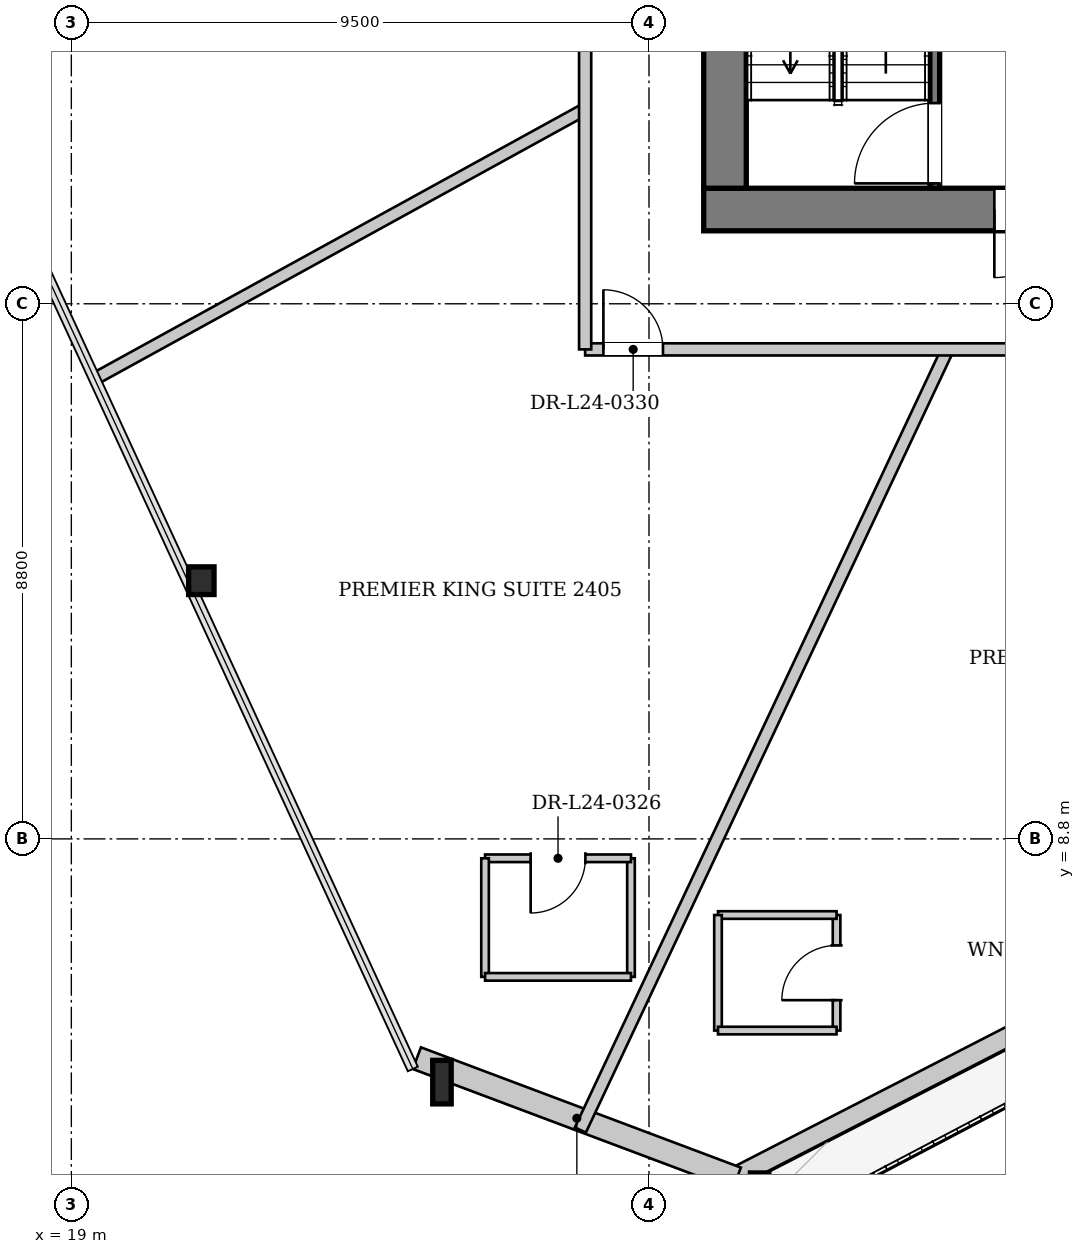
"""IFC4 building model, lengths in metres.
Left out: names, types, materials, properties, quantities, classifications, styles, units other than length and angle.
Written with IfcOpenShell. Run it as: python <this file> out.ifc"""

import sys

from ifc_helpers import new_model, si_unit, direction, frame, frame_2d, origin, origin_2d, place, context, subcontext, project, spatial, rectangle, i_section, extrude, source, transform, mapped, element, fill, save


model = new_model("IFC4")
c1 = context("Model", 3, precision=1e-05, world=origin(), true_north=direction((0.0, 1.0)))
c2 = subcontext(c1, "Body", "Model", "MODEL_VIEW")
j1 = project(units=[si_unit("LENGTHUNIT", "METRE"), si_unit("PLANEANGLEUNIT", "RADIAN")], contexts=[c1])
p1 = place(None, origin())
s1 = spatial("IfcSite", under=j1, at=p1, CompositionType="ELEMENT")
p2 = place(p1, origin())
s2 = spatial("IfcBuilding", under=s1, at=p2, CompositionType="ELEMENT")
p3 = place(p2, frame((0.0, 0.0, 95.05)))
s3 = spatial("IfcBuildingStorey", under=s2, at=p3, CompositionType="ELEMENT", Elevation=95.05)
m1 = source(origin(), c2, "Body", "SweptSolid", [
    extrude(i_section(OverallWidth=0.418, OverallDepth=0.455, WebThickness=0.038, FlangeThickness=0.059, at=origin_2d()), origin(), (0.0, 0.0, 1.0), 3.509),
])
p4 = place(p3, frame((20.779, 13.337, 0.0), z_axis=(0.204689999559, -0.165936658378, 0.964659022394), x_axis=(0.629737371555, 0.776808111998, 0.0)))
e1 = element("IfcColumn", 1, at=p4, inside=s3, PredefinedType="COLUMN", context=c2, shape_type="MappedRepresentation", body=[
    mapped(m1, transform((0.0, 0.0, 0.0), x_axis=(1.0, 0.0, 0.0), y_axis=(0.0, 1.0, 0.0), z_axis=(0.0, 0.0, 1.0), scale=1.0)),
])
m2 = source(origin(), c2, "Body", "SweptSolid", [
    extrude(i_section(OverallWidth=0.304, OverallDepth=0.716, WebThickness=0.021, FlangeThickness=0.04, at=origin_2d()), origin(), (0.0, 0.0, 1.0), 3.544),
])
p5 = place(p3, frame((24.616, 5.016, 0.0), z_axis=(0.270218966562, -0.122056591575, 0.955030836446), x_axis=(0.411648964628, 0.911342487718, 0.0)))
e2 = element("IfcColumn", 2, at=p5, inside=s3, PredefinedType="COLUMN", context=c2, shape_type="MappedRepresentation", body=[
    mapped(m2, transform((0.0, 0.0, 0.0), x_axis=(1.0, 0.0, 0.0), y_axis=(0.0, 1.0, 0.0), z_axis=(0.0, 0.0, 1.0), scale=1.0)),
])
p6 = place(p3, frame((51.286, 14.217, 0.0), z_axis=(0.0, 0.0, 1.0), x_axis=(-0.889491175816, -0.456952347785, 0.0)))
e3 = element("IfcWall", 3, at=p6, inside=s3, PredefinedType="SOLIDWALL", context=c2, shape_type="SweptSolid", body=[
    extrude(rectangle(XDim=24.151, YDim=0.32, at=frame_2d((12.075, 0.0))), origin(), (0.0, 0.0, 1.0), 2.692),
])
p7 = place(p6, frame((7.178, 0.0, 0.0)))
e4 = element("IfcOpeningElement", 4, at=p7, cuts=e3, PredefinedType="OPENING", context=c2, shape_type="SweptSolid", body=[
    extrude(rectangle(XDim=1.1, YDim=2.3, at=frame_2d((0.55, 1.15))), frame((0.0, 0.17, 0.0), z_axis=(0.0, -1.0, 0.0), x_axis=(1.0, 0.0, 0.0)), (0.0, 0.0, 1.0), 0.34),
])
p8 = place(p6, frame((16.971, 0.0, 0.372)))
e5 = element("IfcOpeningElement", 5, at=p8, cuts=e3, PredefinedType="OPENING", context=c2, shape_type="SweptSolid", body=[
    extrude(rectangle(XDim=1.8, YDim=2.2, at=frame_2d((0.9, 1.1))), frame((0.0, 0.17, 0.0), z_axis=(0.0, -1.0, 0.0), x_axis=(1.0, 0.0, 0.0)), (0.0, 0.0, 1.0), 0.34),
])
p9 = place(p3, frame((29.944, 3.217, 0.0), z_axis=(0.0, 0.0, 1.0), x_axis=(-0.936080825312, 0.351785003211, 0.0)))
e6 = element("IfcWall", 6, at=p9, inside=s3, PredefinedType="SOLIDWALL", context=c2, shape_type="SweptSolid", body=[
    extrude(rectangle(XDim=5.621, YDim=0.38, at=frame_2d((2.811, 0.0))), origin(), (0.0, 0.0, 1.0), 2.692),
])
p10 = place(p3, frame((46.6, 19.15, 0.0), z_axis=(0.0, 0.0, 1.0), x_axis=(-1.0, 0.0, 0.0)))
e7 = element("IfcWall", 7, at=p10, inside=s3, PredefinedType="SHEAR", context=c2, shape_type="SweptSolid", body=[
    extrude(rectangle(XDim=17.2, YDim=0.7, at=frame_2d((8.6, 0.0))), origin(), (0.0, 0.0, 1.0), 3.3),
])
p11 = place(p10, frame((4.8, 0.0, 0.0)))
e8 = element("IfcOpeningElement", 8, at=p11, cuts=e7, PredefinedType="OPENING", context=c2, shape_type="SweptSolid", body=[
    extrude(rectangle(XDim=1.12, YDim=2.25, at=frame_2d((0.56, 1.125))), frame((0.0, 0.36, 0.0), z_axis=(0.0, -1.0, 0.0), x_axis=(1.0, 0.0, 0.0)), (0.0, 0.0, 1.0), 0.72),
])
p12 = place(p10, frame((11.3, 0.0, 0.0)))
e9 = element("IfcOpeningElement", 9, at=p12, cuts=e7, PredefinedType="OPENING", context=c2, shape_type="SweptSolid", body=[
    extrude(rectangle(XDim=1.12, YDim=2.25, at=frame_2d((0.56, 1.125))), frame((0.0, 0.36, 0.0), z_axis=(0.0, -1.0, 0.0), x_axis=(1.0, 0.0, 0.0)), (0.0, 0.0, 1.0), 0.72),
])
p13 = place(p3, frame((29.75, 19.5, 0.0), z_axis=(0.0, 0.0, 1.0), x_axis=(0.0, 1.0, 0.0)))
e10 = element("IfcWall", 10, at=p13, inside=s3, PredefinedType="SHEAR", context=c2, shape_type="SweptSolid", body=[
    extrude(rectangle(XDim=14.2, YDim=0.7, at=frame_2d((7.1, 0.0))), origin(), (0.0, 0.0, 1.0), 3.3),
])
p14 = place(p13, frame((7.42, 0.0, 0.0)))
e11 = element("IfcOpeningElement", 11, at=p14, cuts=e10, PredefinedType="OPENING", context=c2, shape_type="SweptSolid", body=[
    extrude(rectangle(XDim=1.6, YDim=2.2, at=frame_2d((0.8, 1.1))), frame((0.0, 0.36, 0.0), z_axis=(0.0, -1.0, 0.0), x_axis=(1.0, 0.0, 0.0)), (0.0, 0.0, 1.0), 0.72),
])
p15 = place(p3, frame((33.2, 19.5, 0.0), z_axis=(0.0, 0.0, 1.0), x_axis=(0.0, 1.0, 0.0)))
e12 = element("IfcWall", 12, at=p15, inside=s3, PredefinedType="PARTITIONING", context=c2, shape_type="SweptSolid", body=[
    extrude(rectangle(XDim=7.46, YDim=0.16, at=frame_2d((3.73, 0.0))), origin(), (0.0, 0.0, 1.0), 3.3),
])
p16 = place(p15, frame((0.08, 0.0, 0.0)))
e13 = element("IfcOpeningElement", 13, at=p16, cuts=e12, PredefinedType="OPENING", context=c2, shape_type="SweptSolid", body=[
    extrude(rectangle(XDim=1.32, YDim=2.2, at=frame_2d((0.66, 1.1))), frame((0.0, 0.09, 0.0), z_axis=(0.0, -1.0, 0.0), x_axis=(1.0, 0.0, 0.0)), (0.0, 0.0, 1.0), 0.18),
])
p17 = place(p3, frame((27.45, 20.8, 0.0), z_axis=(0.0, 0.0, 1.0), x_axis=(-0.876309701185, -0.481748178625, 0.0)))
e14 = element("IfcWall", 14, at=p17, inside=s3, PredefinedType="PARTITIONING", context=c2, shape_type="SweptSolid", body=[
    extrude(rectangle(XDim=9.176, YDim=0.2, at=frame_2d((4.588, 0.0))), origin(), (0.0, 0.0, 1.0), 3.3),
])
p18 = place(p3, frame((33.412, 16.85, 0.0), z_axis=(0.0, 0.0, 1.0), x_axis=(-0.425776318431, -0.904828451511, 0.0)))
e15 = element("IfcWall", 15, at=p18, inside=s3, PredefinedType="PARTITIONING", context=c2, shape_type="SweptSolid", body=[
    extrude(rectangle(XDim=14.188, YDim=0.2, at=frame_2d((7.094, 0.0))), origin(), (0.0, 0.0, 1.0), 3.3),
])
p19 = place(p3, frame((28.204, 6.531, 0.0), z_axis=(0.0, 0.0, 1.0), x_axis=(0.0, 1.0, 0.0)))
e16 = element("IfcWall", 16, at=p19, inside=s3, PredefinedType="PARTITIONING", context=c2, shape_type="SweptSolid", body=[
    extrude(rectangle(XDim=1.95, YDim=0.125, at=frame_2d((0.975, 0.0))), origin(), (0.0, 0.0, 1.0), 3.3),
])
p20 = place(p3, frame((28.204, 8.481, 0.0), z_axis=(0.0, 0.0, 1.0), x_axis=(-1.0, 0.0, 0.0)))
e17 = element("IfcWall", 17, at=p20, inside=s3, PredefinedType="PARTITIONING", context=c2, shape_type="SweptSolid", body=[
    extrude(rectangle(XDim=2.4, YDim=0.125, at=frame_2d((1.2, 0.0))), origin(), (0.0, 0.0, 1.0), 3.3),
])
p21 = place(p20, frame((0.75, 0.0, 0.0)))
e18 = element("IfcOpeningElement", 18, at=p21, cuts=e17, PredefinedType="OPENING", context=c2, shape_type="SweptSolid", body=[
    extrude(rectangle(XDim=0.9, YDim=2.1, at=frame_2d((0.45, 1.05))), frame((0.0, 0.073, 0.0), z_axis=(0.0, -1.0, 0.0), x_axis=(1.0, 0.0, 0.0)), (0.0, 0.0, 1.0), 0.145),
])
p22 = place(p3, frame((25.804, 8.481, 0.0), z_axis=(0.0, 0.0, 1.0), x_axis=(0.0, -1.0, 0.0)))
e19 = element("IfcWall", 19, at=p22, inside=s3, PredefinedType="PARTITIONING", context=c2, shape_type="SweptSolid", body=[
    extrude(rectangle(XDim=1.95, YDim=0.125, at=frame_2d((0.975, 0.0))), origin(), (0.0, 0.0, 1.0), 3.3),
])
p23 = place(p3, frame((25.804, 6.531, 0.0), z_axis=(0.0, 0.0, 1.0), x_axis=(1.0, 0.0, 0.0)))
e20 = element("IfcWall", 20, at=p23, inside=s3, PredefinedType="PARTITIONING", context=c2, shape_type="SweptSolid", body=[
    extrude(rectangle(XDim=2.4, YDim=0.125, at=frame_2d((1.2, 0.0))), origin(), (0.0, 0.0, 1.0), 3.3),
])
p24 = place(p3, frame((31.585, 5.648, 0.0), z_axis=(0.0, 0.0, 1.0), x_axis=(0.0, 1.0, 0.0)))
e21 = element("IfcWall", 21, at=p24, inside=s3, PredefinedType="PARTITIONING", context=c2, shape_type="SweptSolid", body=[
    extrude(rectangle(XDim=1.9, YDim=0.125, at=frame_2d((0.95, 0.0))), origin(), (0.0, 0.0, 1.0), 2.795),
])
p25 = place(p24, frame((0.5, 0.0, 0.0)))
e22 = element("IfcOpeningElement", 22, at=p25, cuts=e21, PredefinedType="OPENING", context=c2, shape_type="SweptSolid", body=[
    extrude(rectangle(XDim=0.9, YDim=2.1, at=frame_2d((0.45, 1.05))), frame((0.0, 0.073, 0.0), z_axis=(0.0, -1.0, 0.0), x_axis=(1.0, 0.0, 0.0)), (0.0, 0.0, 1.0), 0.145),
])
p26 = place(p3, frame((31.585, 7.548, 0.0), z_axis=(0.0, 0.0, 1.0), x_axis=(-1.0, 0.0, 0.0)))
e23 = element("IfcWall", 23, at=p26, inside=s3, PredefinedType="PARTITIONING", context=c2, shape_type="SweptSolid", body=[
    extrude(rectangle(XDim=1.95, YDim=0.125, at=frame_2d((0.975, 0.0))), origin(), (0.0, 0.0, 1.0), 3.3),
])
p27 = place(p3, frame((29.635, 7.548, 0.0), z_axis=(0.0, 0.0, 1.0), x_axis=(0.0, -1.0, 0.0)))
e24 = element("IfcWall", 24, at=p27, inside=s3, PredefinedType="PARTITIONING", context=c2, shape_type="SweptSolid", body=[
    extrude(rectangle(XDim=1.9, YDim=0.125, at=frame_2d((0.95, 0.0))), origin(), (0.0, 0.0, 1.0), 3.3),
])
p28 = place(p3, frame((29.635, 5.648, 0.0), z_axis=(0.0, 0.0, 1.0), x_axis=(1.0, 0.0, 0.0)))
e25 = element("IfcWall", 25, at=p28, inside=s3, PredefinedType="PARTITIONING", context=c2, shape_type="SweptSolid", body=[
    extrude(rectangle(XDim=1.95, YDim=0.125, at=frame_2d((0.975, 0.0))), origin(), (0.0, 0.0, 1.0), 3.3),
])
p29 = place(p3, frame((27.45, 16.85, 0.0), z_axis=(0.0, 0.0, 1.0), x_axis=(1.0, 0.0, 0.0)))
e26 = element("IfcWall", 26, at=p29, inside=s3, PredefinedType="PARTITIONING", context=c2, shape_type="SweptSolid", body=[
    extrude(rectangle(XDim=21.1, YDim=0.2, at=frame_2d((10.55, 0.0))), origin(), (0.0, 0.0, 1.0), 3.3),
])
p30 = place(p29, frame((0.3, 0.0, 0.0)))
e27 = element("IfcOpeningElement", 27, at=p30, cuts=e26, PredefinedType="OPENING", context=c2, shape_type="SweptSolid", body=[
    extrude(rectangle(XDim=0.98, YDim=2.15, at=frame_2d((0.49, 1.075))), frame((0.0, 0.11, 0.0), z_axis=(0.0, -1.0, 0.0), x_axis=(1.0, 0.0, 0.0)), (0.0, 0.0, 1.0), 0.22),
])
p31 = place(p29, frame((8.16, 0.0, 0.0)))
e28 = element("IfcOpeningElement", 28, at=p31, cuts=e26, PredefinedType="OPENING", context=c2, shape_type="SweptSolid", body=[
    extrude(rectangle(XDim=0.98, YDim=2.15, at=frame_2d((0.49, 1.075))), frame((0.0, 0.11, 0.0), z_axis=(0.0, -1.0, 0.0), x_axis=(1.0, 0.0, 0.0)), (0.0, 0.0, 1.0), 0.22),
])
p32 = place(p29, frame((18.286, 0.0, 0.0)))
e29 = element("IfcOpeningElement", 29, at=p32, cuts=e26, PredefinedType="OPENING", context=c2, shape_type="SweptSolid", body=[
    extrude(rectangle(XDim=0.98, YDim=2.15, at=frame_2d((0.49, 1.075))), frame((0.0, 0.11, 0.0), z_axis=(0.0, -1.0, 0.0), x_axis=(1.0, 0.0, 0.0)), (0.0, 0.0, 1.0), 0.22),
])
p33 = place(p3, frame((27.45, 16.85, 0.0), z_axis=(0.0, 0.0, 1.0), x_axis=(0.0, 1.0, 0.0)))
e30 = element("IfcWall", 30, at=p33, inside=s3, PredefinedType="PARTITIONING", context=c2, shape_type="SweptSolid", body=[
    extrude(rectangle(XDim=19.5, YDim=0.2, at=frame_2d((9.75, 0.0))), origin(), (0.0, 0.0, 1.0), 3.3),
])
p34 = place(p33, frame((15.435, 0.0, 0.0)))
e31 = element("IfcOpeningElement", 31, at=p34, cuts=e30, PredefinedType="OPENING", context=c2, shape_type="SweptSolid", body=[
    extrude(rectangle(XDim=0.98, YDim=2.15, at=frame_2d((0.49, 1.075))), frame((0.0, 0.11, 0.0), z_axis=(0.0, -1.0, 0.0), x_axis=(1.0, 0.0, 0.0)), (0.0, 0.0, 1.0), 0.22),
])
p35 = place(p33, frame((6.365, 0.0, 0.0)))
e32 = element("IfcOpeningElement", 32, at=p35, cuts=e30, PredefinedType="OPENING", context=c2, shape_type="SweptSolid", body=[
    extrude(rectangle(XDim=0.98, YDim=2.15, at=frame_2d((0.49, 1.075))), frame((0.0, 0.11, 0.0), z_axis=(0.0, -1.0, 0.0), x_axis=(1.0, 0.0, 0.0)), (0.0, 0.0, 1.0), 0.22),
])
m3 = source(origin(), c2, "Body", "SweptSolid", [
    extrude(rectangle(XDim=1.12, YDim=2.25, at=frame_2d((0.56, 1.125))), frame((0.0, 0.025, 0.0), z_axis=(0.0, -1.0, 0.0), x_axis=(1.0, 0.0, 0.0)), (0.0, 0.0, 1.0), 0.05),
])
p36 = place(p12, origin())
e33 = element("IfcDoor", 33, at=p36, inside=s3, OperationType="SINGLE_SWING_RIGHT", PredefinedType="DOOR", context=c2, shape_type="MappedRepresentation", body=[
    mapped(m3, transform((0.0, 0.0, 0.0), x_axis=(1.0, 0.0, 0.0), y_axis=(0.0, 1.0, 0.0), z_axis=(0.0, 0.0, 1.0), scale=1.0)),
])
fill(e9, e33)
m4 = source(origin(), c2, "Body", "SweptSolid", [
    extrude(rectangle(XDim=1.32, YDim=2.2, at=frame_2d((0.66, 1.1))), frame((0.0, 0.025, 0.0), z_axis=(0.0, -1.0, 0.0), x_axis=(1.0, 0.0, 0.0)), (0.0, 0.0, 1.0), 0.05),
])
p37 = place(p16, origin())
e34 = element("IfcDoor", 34, at=p37, inside=s3, OperationType="SINGLE_SWING_LEFT", PredefinedType="DOOR", context=c2, shape_type="MappedRepresentation", body=[
    mapped(m4, transform((0.0, 0.0, 0.0), x_axis=(1.0, 0.0, 0.0), y_axis=(0.0, 1.0, 0.0), z_axis=(0.0, 0.0, 1.0), scale=1.0)),
])
fill(e13, e34)
m5 = source(origin(), c2, "Body", "SweptSolid", [
    extrude(rectangle(XDim=0.9, YDim=2.1, at=frame_2d((0.45, 1.05))), frame((0.0, 0.025, 0.0), z_axis=(0.0, -1.0, 0.0), x_axis=(1.0, 0.0, 0.0)), (0.0, 0.0, 1.0), 0.05),
])
p38 = place(p21, origin())
e35 = element("IfcDoor", 35, at=p38, inside=s3, OperationType="SINGLE_SWING_RIGHT", PredefinedType="DOOR", context=c2, shape_type="MappedRepresentation", body=[
    mapped(m5, transform((0.0, 0.0, 0.0), x_axis=(1.0, 0.0, 0.0), y_axis=(0.0, 1.0, 0.0), z_axis=(0.0, 0.0, 1.0), scale=1.0)),
])
fill(e18, e35)
p39 = place(p25, origin())
e36 = element("IfcDoor", 36, at=p39, inside=s3, OperationType="SINGLE_SWING_LEFT", PredefinedType="DOOR", context=c2, shape_type="MappedRepresentation", body=[
    mapped(m5, transform((0.0, 0.0, 0.0), x_axis=(1.0, 0.0, 0.0), y_axis=(0.0, 1.0, 0.0), z_axis=(0.0, 0.0, 1.0), scale=1.0)),
])
fill(e22, e36)
m6 = source(origin(), c2, "Body", "SweptSolid", [
    extrude(rectangle(XDim=0.98, YDim=2.15, at=frame_2d((0.49, 1.075))), frame((0.0, 0.025, 0.0), z_axis=(0.0, -1.0, 0.0), x_axis=(1.0, 0.0, 0.0)), (0.0, 0.0, 1.0), 0.05),
])
p40 = place(p30, origin())
e37 = element("IfcDoor", 37, at=p40, inside=s3, OperationType="SINGLE_SWING_LEFT", PredefinedType="DOOR", context=c2, shape_type="MappedRepresentation", body=[
    mapped(m6, transform((0.0, 0.0, 0.0), x_axis=(1.0, 0.0, 0.0), y_axis=(0.0, 1.0, 0.0), z_axis=(0.0, 0.0, 1.0), scale=1.0)),
])
fill(e27, e37)
save(model, sys.argv[1])
